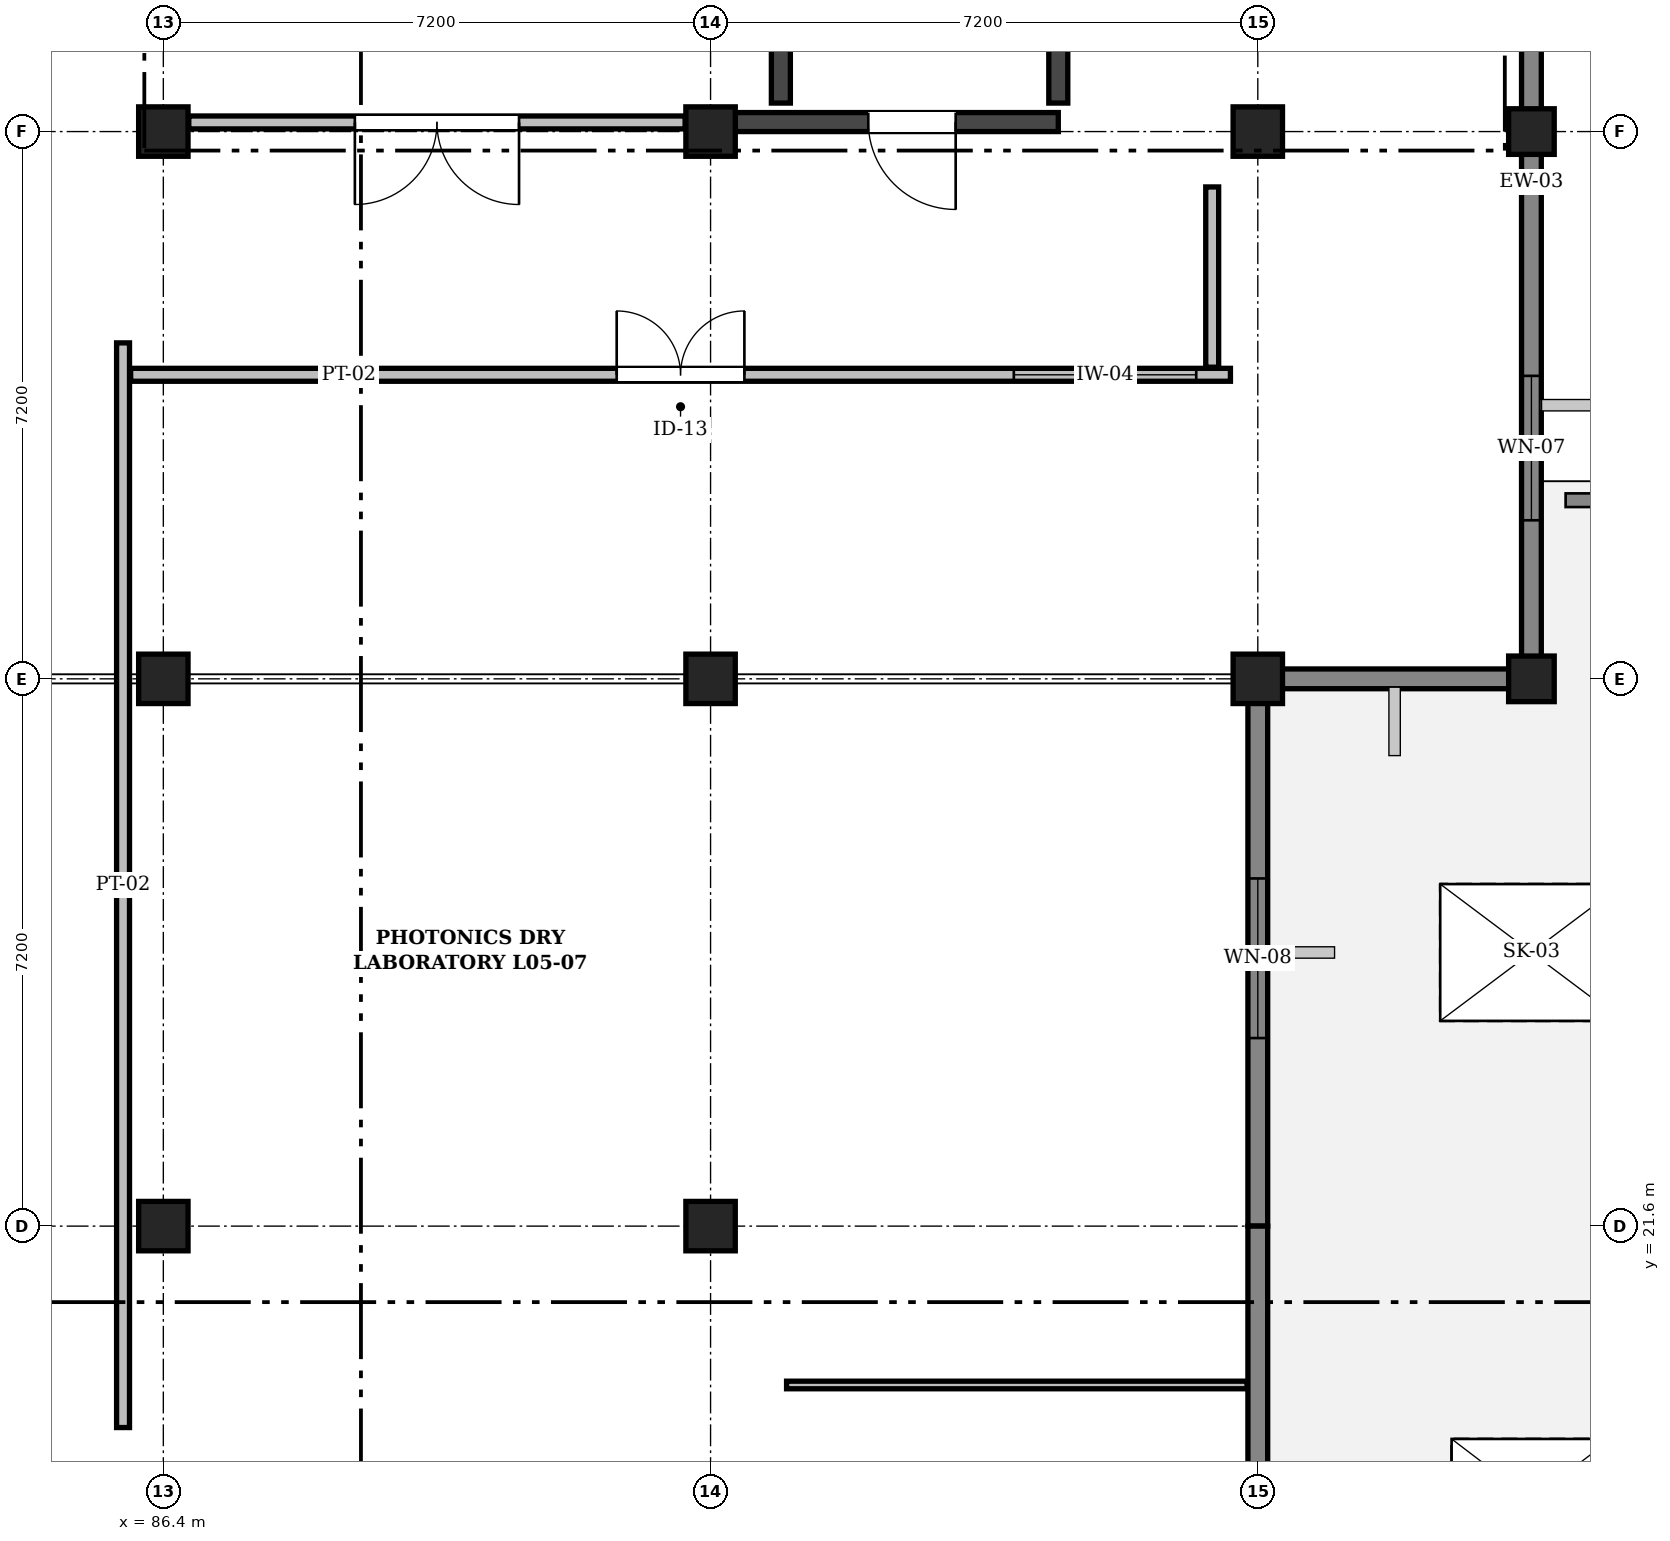
"""IFC4 building model, lengths in metres.
Left out: names, types, materials, properties, quantities, classifications, styles, units other than length and angle.
Written with IfcOpenShell. Run it as: python <this file> out.ifc"""

import sys

from ifc_helpers import new_model, si_unit, direction, frame, frame_2d, origin, origin_2d, place, context, subcontext, project, spatial, rectangle, extrude, element, fill, save


model = new_model("IFC4")
c1 = context("Model", 3, precision=1e-05, world=origin(), true_north=direction((0.0, 1.0)))
c2 = subcontext(c1, "Body", "Model", "MODEL_VIEW")
j1 = project(units=[si_unit("LENGTHUNIT", "METRE"), si_unit("PLANEANGLEUNIT", "RADIAN")], contexts=[c1])
p1 = place(None, origin())
s1 = spatial("IfcSite", under=j1, at=p1, CompositionType="ELEMENT")
p2 = place(p1, origin())
s2 = spatial("IfcBuilding", under=s1, at=p2, CompositionType="ELEMENT")
p3 = place(p2, frame((0.0, 0.0, 23.4)))
s3 = spatial("IfcBuildingStorey", under=s2, at=p3, CompositionType="ELEMENT", Elevation=23.4)
for number, where, z_axis, x_axis in (
    (1, (86.4, 21.6, 0.0), (0.0, 0.0, 1.0), (1.0, 0.0, 0.0)),
    (2, (86.4, 28.8, 0.0), (0.0, 0.0, 1.0), (1.0, 0.0, 0.0)),
    (3, (86.4, 36.0, 0.0), (0.0, 0.0, 1.0), (1.0, 0.0, 0.0)),
    (4, (93.6, 21.6, 0.0), (0.0, 0.0, 1.0), (1.0, 0.0, 0.0)),
    (5, (93.6, 28.8, 0.0), (0.0, 0.0, 1.0), (1.0, 0.0, 0.0)),
    (6, (93.6, 36.0, 0.0), (0.0, 0.0, 1.0), (1.0, 0.0, 0.0)),
    (7, (100.8, 28.8, 0.0), (0.0, 0.0, 1.0), (1.0, 0.0, 0.0)),
    (8, (100.8, 36.0, 0.0), (0.0, 0.0, 1.0), (1.0, 0.0, 0.0)),
):
    element("IfcColumn", number, at=place(p3, frame(where, z_axis=z_axis, x_axis=x_axis)), inside=s3, PredefinedType="COLUMN", context=c2, shape_type="SweptSolid", body=[
        extrude(rectangle(XDim=0.65, YDim=0.65, at=origin_2d()), origin(), (0.0, 0.0, 1.0), 4.5),
    ])
for number, where, z_axis, x_axis in (
    (9, (104.4, 28.8, 0.0), (0.0, 0.0, 1.0), (1.0, 0.0, 0.0)),
    (10, (104.4, 36.0, 0.0), (0.0, 0.0, 1.0), (1.0, 0.0, 0.0)),
):
    element("IfcColumn", number, at=place(p3, frame(where, z_axis=z_axis, x_axis=x_axis)), inside=s3, PredefinedType="COLUMN", context=c2, shape_type="SweptSolid", body=[
        extrude(rectangle(XDim=0.6, YDim=0.6, at=origin_2d()), origin(), (0.0, 0.0, 1.0), 4.5),
    ])
p4 = place(p3, frame((104.4, 43.2, 0.0), z_axis=(0.0, 0.0, 1.0), x_axis=(0.0, -1.0, 0.0)))
e11 = element("IfcWall", 11, at=p4, inside=s3, PredefinedType="SOLIDWALL", context=c2, shape_type="SweptSolid", body=[
    extrude(rectangle(XDim=7.2, YDim=0.26, at=frame_2d((3.6, 0.0))), origin(), (0.0, 0.0, 1.0), 4.22),
])
p5 = place(p4, frame((2.725, 0.0, 0.95)))
e12 = element("IfcOpeningElement", 12, at=p5, cuts=e11, PredefinedType="OPENING", context=c2, shape_type="SweptSolid", body=[
    extrude(rectangle(XDim=1.75, YDim=1.3, at=frame_2d((0.875, 0.65))), frame((0.0, 0.142, 0.0), z_axis=(0.0, -1.0, 0.0), x_axis=(1.0, 0.0, 0.0)), (0.0, 0.0, 1.0), 0.284),
])
p6 = place(p3, frame((104.4, 36.0, 0.0), z_axis=(0.0, 0.0, 1.0), x_axis=(0.0, -1.0, 0.0)))
e13 = element("IfcWall", 13, at=p6, inside=s3, PredefinedType="SOLIDWALL", context=c2, shape_type="SweptSolid", body=[
    extrude(rectangle(XDim=7.048, YDim=0.26, at=frame_2d((3.524, 0.0))), origin(), (0.0, 0.0, 1.0), 4.22),
])
p7 = place(p6, frame((3.214, 0.0, 0.95)))
e14 = element("IfcOpeningElement", 14, at=p7, cuts=e13, PredefinedType="OPENING", context=c2, shape_type="SweptSolid", body=[
    extrude(rectangle(XDim=1.9, YDim=1.3, at=frame_2d((0.95, 0.65))), frame((0.0, 0.142, 0.0), z_axis=(0.0, -1.0, 0.0), x_axis=(1.0, 0.0, 0.0)), (0.0, 0.0, 1.0), 0.284),
])
p8 = place(p3, frame((104.55, 28.8, 0.0), z_axis=(0.0, 0.0, 1.0), x_axis=(-1.0, 0.0, 0.0)))
e15 = element("IfcWall", 15, at=p8, inside=s3, PredefinedType="SOLIDWALL", context=c2, shape_type="SweptSolid", body=[
    extrude(rectangle(XDim=3.9, YDim=0.26, at=frame_2d((1.95, 0.0))), origin(), (0.0, 0.0, 1.0), 4.22),
])
p9 = place(p3, frame((100.8, 28.648, 0.0), z_axis=(0.0, 0.0, 1.0), x_axis=(0.0, -1.0, 0.0)))
e16 = element("IfcWall", 16, at=p9, inside=s3, PredefinedType="SOLIDWALL", context=c2, shape_type="SweptSolid", body=[
    extrude(rectangle(XDim=7.048, YDim=0.26, at=frame_2d((3.524, 0.0))), origin(), (0.0, 0.0, 1.0), 4.22),
])
p10 = place(p9, frame((2.474, 0.0, 0.95)))
e17 = element("IfcOpeningElement", 17, at=p10, cuts=e16, PredefinedType="OPENING", context=c2, shape_type="SweptSolid", body=[
    extrude(rectangle(XDim=2.1, YDim=1.3, at=frame_2d((1.05, 0.65))), frame((0.0, 0.142, 0.0), z_axis=(0.0, -1.0, 0.0), x_axis=(1.0, 0.0, 0.0)), (0.0, 0.0, 1.0), 0.284),
])
p11 = place(p3, frame((100.8, 21.6, 0.0), z_axis=(0.0, 0.0, 1.0), x_axis=(0.0, -1.0, 0.0)))
e18 = element("IfcWall", 18, at=p11, inside=s3, PredefinedType="SOLIDWALL", context=c2, shape_type="SweptSolid", body=[
    extrude(rectangle(XDim=7.2, YDim=0.26, at=frame_2d((3.6, 0.0))), origin(), (0.0, 0.0, 1.0), 4.22),
])
p12 = place(p11, frame((3.485, 0.0, 0.95)))
e19 = element("IfcOpeningElement", 19, at=p12, cuts=e18, PredefinedType="OPENING", context=c2, shape_type="SweptSolid", body=[
    extrude(rectangle(XDim=2.3, YDim=1.3, at=frame_2d((1.15, 0.65))), frame((0.0, 0.142, 0.0), z_axis=(0.0, -1.0, 0.0), x_axis=(1.0, 0.0, 0.0)), (0.0, 0.0, 1.0), 0.284),
])
p13 = place(p3, frame((104.85, 31.15, 0.0), z_axis=(0.0, 0.0, 1.0), x_axis=(1.0, 0.0, 0.0)))
e20 = element("IfcWall", 20, at=p13, inside=s3, PredefinedType="PARAPET", context=c2, shape_type="SweptSolid", body=[
    extrude(rectangle(XDim=7.224, YDim=0.18, at=frame_2d((3.612, 0.0))), origin(), (0.0, 0.0, 1.0), 0.95),
])
p14 = place(p3, frame((93.925, 36.125, 0.0), z_axis=(0.0, 0.0, 1.0), x_axis=(1.0, 0.0, 0.0)))
e21 = element("IfcWall", 21, at=p14, inside=s3, PredefinedType="SHEAR", context=c2, shape_type="SweptSolid", body=[
    extrude(rectangle(XDim=4.25, YDim=0.25, at=frame_2d((2.125, 0.0))), origin(), (0.0, 0.0, 1.0), 4.25),
])
p15 = place(p14, frame((1.75, 0.0, 0.0)))
e22 = element("IfcOpeningElement", 22, at=p15, cuts=e21, PredefinedType="OPENING", context=c2, shape_type="SweptSolid", body=[
    extrude(rectangle(XDim=1.15, YDim=2.15, at=frame_2d((0.575, 1.075))), frame((0.0, 0.137, 0.0), z_axis=(0.0, -1.0, 0.0), x_axis=(1.0, 0.0, 0.0)), (0.0, 0.0, 1.0), 0.274),
])
p16 = place(p3, frame((94.525, 36.375, 0.0), z_axis=(0.0, 0.0, 1.0), x_axis=(0.0, 1.0, 0.0)))
e23 = element("IfcWall", 23, at=p16, inside=s3, PredefinedType="SHEAR", context=c2, shape_type="SweptSolid", body=[
    extrude(rectangle(XDim=2.77, YDim=0.25, at=frame_2d((1.385, 0.0))), origin(), (0.0, 0.0, 1.0), 4.25),
])
p17 = place(p3, frame((98.175, 36.375, 0.0), z_axis=(0.0, 0.0, 1.0), x_axis=(0.0, 1.0, 0.0)))
e24 = element("IfcWall", 24, at=p17, inside=s3, PredefinedType="SHEAR", context=c2, shape_type="SweptSolid", body=[
    extrude(rectangle(XDim=3.225, YDim=0.25, at=frame_2d((1.613, 0.0))), origin(), (0.0, 0.0, 1.0), 4.25),
])
p18 = place(p3, frame((85.87, 18.95, 0.0), z_axis=(0.0, 0.0, 1.0), x_axis=(0.0, 1.0, 0.0)))
e25 = element("IfcWall", 25, at=p18, inside=s3, PredefinedType="PARTITIONING", context=c2, shape_type="SweptSolid", body=[
    extrude(rectangle(XDim=14.27, YDim=0.17, at=frame_2d((7.135, 0.0))), origin(), (0.0, 0.0, 1.0), 4.16),
])
p19 = place(p3, frame((85.97, 32.8, 0.0), z_axis=(0.0, 0.0, 1.0), x_axis=(1.0, 0.0, 0.0)))
e26 = element("IfcWall", 26, at=p19, inside=s3, PredefinedType="PARTITIONING", context=c2, shape_type="SweptSolid", body=[
    extrude(rectangle(XDim=14.47, YDim=0.17, at=frame_2d((7.235, 0.0))), origin(), (0.0, 0.0, 1.0), 4.16),
])
p20 = place(p19, frame((6.395, 0.0, 0.0)))
e27 = element("IfcOpeningElement", 27, at=p20, cuts=e26, PredefinedType="OPENING", context=c2, shape_type="SweptSolid", body=[
    extrude(rectangle(XDim=1.68, YDim=2.28, at=frame_2d((0.84, 1.14))), frame((0.0, 0.097, 0.0), z_axis=(0.0, -1.0, 0.0), x_axis=(1.0, 0.0, 0.0)), (0.0, 0.0, 1.0), 0.194),
])
p21 = place(p19, frame((11.62, 0.0, 1.05)))
e28 = element("IfcOpeningElement", 28, at=p21, cuts=e26, PredefinedType="OPENING", context=c2, shape_type="SweptSolid", body=[
    extrude(rectangle(XDim=2.4, YDim=1.15, at=frame_2d((1.2, 0.575))), frame((0.0, 0.097, 0.0), z_axis=(0.0, -1.0, 0.0), x_axis=(1.0, 0.0, 0.0)), (0.0, 0.0, 1.0), 0.194),
])
p22 = place(p3, frame((100.2, 32.9, 0.0), z_axis=(0.0, 0.0, 1.0), x_axis=(0.0, 1.0, 0.0)))
e29 = element("IfcWall", 29, at=p22, inside=s3, PredefinedType="PARTITIONING", context=c2, shape_type="SweptSolid", body=[
    extrude(rectangle(XDim=2.372, YDim=0.17, at=frame_2d((1.186, 0.0))), origin(), (0.0, 0.0, 1.0), 4.16),
])
p23 = place(p3, frame((86.735, 36.12, 0.0), z_axis=(0.0, 0.0, 1.0), x_axis=(1.0, 0.0, 0.0)))
e30 = element("IfcWall", 30, at=p23, inside=s3, PredefinedType="PARTITIONING", context=c2, shape_type="SweptSolid", body=[
    extrude(rectangle(XDim=6.53, YDim=0.17, at=frame_2d((3.265, 0.0))), origin(), (0.0, 0.0, 1.0), 3.73),
])
p24 = place(p23, frame((2.185, 0.0, 0.0)))
e31 = element("IfcOpeningElement", 31, at=p24, cuts=e30, PredefinedType="OPENING", context=c2, shape_type="SweptSolid", body=[
    extrude(rectangle(XDim=2.16, YDim=2.35, at=frame_2d((1.08, 1.175))), frame((0.0, 0.097, 0.0), z_axis=(0.0, -1.0, 0.0), x_axis=(1.0, 0.0, 0.0)), (0.0, 0.0, 1.0), 0.194),
])
p25 = place(p3, frame((94.6, 19.51, 0.0), z_axis=(0.0, 0.0, 1.0), x_axis=(1.0, 0.0, 0.0)))
e32 = element("IfcWall", 32, at=p25, inside=s3, PredefinedType="PARTITIONING", context=c2, shape_type="SweptSolid", body=[
    extrude(rectangle(XDim=6.058, YDim=0.1, at=frame_2d((3.029, 0.0))), origin(), (0.0, 0.0, 1.0), 4.16),
])
p26 = place(p7, origin())
e33 = element("IfcWindow", 33, at=p26, inside=s3, PartitioningType="SINGLE_PANEL", PredefinedType="WINDOW", context=c2, shape_type="SweptSolid", body=[
    extrude(rectangle(XDim=1.9, YDim=1.3, at=frame_2d((0.95, 0.65))), frame((0.0, 0.03, 0.0), z_axis=(0.0, -1.0, 0.0), x_axis=(1.0, 0.0, 0.0)), (0.0, 0.0, 1.0), 0.06),
])
fill(e14, e33)
p27 = place(p10, origin())
e34 = element("IfcWindow", 34, at=p27, inside=s3, PartitioningType="SINGLE_PANEL", PredefinedType="WINDOW", context=c2, shape_type="SweptSolid", body=[
    extrude(rectangle(XDim=2.1, YDim=1.3, at=frame_2d((1.05, 0.65))), frame((0.0, 0.03, 0.0), z_axis=(0.0, -1.0, 0.0), x_axis=(1.0, 0.0, 0.0)), (0.0, 0.0, 1.0), 0.06),
])
fill(e17, e34)
p28 = place(p3, frame((0.0, 0.0, -0.25)))
p29 = place(p28, frame((104.4, 18.0, 0.2)))
e35 = element("IfcWindow", 35, at=p29, inside=s3, PartitioningType="SINGLE_PANEL", PredefinedType="SKYLIGHT", context=c2, shape_type="SweptSolid", body=[
    extrude(rectangle(XDim=2.1, YDim=1.6, at=origin_2d()), origin(), (0.0, 0.0, 1.0), 0.05),
])
p30 = place(p28, frame((104.4, 25.2, 0.2)))
e36 = element("IfcWindow", 36, at=p30, inside=s3, PartitioningType="SINGLE_PANEL", PredefinedType="SKYLIGHT", context=c2, shape_type="SweptSolid", body=[
    extrude(rectangle(XDim=2.4, YDim=1.8, at=origin_2d()), origin(), (0.0, 0.0, 1.0), 0.05),
])
p31 = place(p15, frame((1.15, 0.0, 0.0), z_axis=(0.0, 0.0, 1.0), x_axis=(-1.0, 0.0, 0.0)))
e37 = element("IfcDoor", 37, at=p31, inside=s3, OperationType="SINGLE_SWING_LEFT", PredefinedType="DOOR", context=c2, shape_type="SweptSolid", body=[
    extrude(rectangle(XDim=1.15, YDim=2.15, at=frame_2d((0.575, 1.075))), frame((0.0, 0.025, 0.0), z_axis=(0.0, -1.0, 0.0), x_axis=(1.0, 0.0, 0.0)), (0.0, 0.0, 1.0), 0.05),
])
fill(e22, e37)
p32 = place(p20, origin())
e38 = element("IfcDoor", 38, at=p32, inside=s3, OperationType="DOUBLE_DOOR_SINGLE_SWING", PredefinedType="DOOR", context=c2, shape_type="SweptSolid", body=[
    extrude(rectangle(XDim=1.68, YDim=2.28, at=frame_2d((0.84, 1.14))), frame((0.0, 0.025, 0.0), z_axis=(0.0, -1.0, 0.0), x_axis=(1.0, 0.0, 0.0)), (0.0, 0.0, 1.0), 0.05),
])
fill(e27, e38)
p33 = place(p21, origin())
e39 = element("IfcWindow", 39, at=p33, inside=s3, PartitioningType="SINGLE_PANEL", PredefinedType="WINDOW", context=c2, shape_type="SweptSolid", body=[
    extrude(rectangle(XDim=2.4, YDim=1.15, at=frame_2d((1.2, 0.575))), frame((0.0, 0.03, 0.0), z_axis=(0.0, -1.0, 0.0), x_axis=(1.0, 0.0, 0.0)), (0.0, 0.0, 1.0), 0.06),
])
fill(e28, e39)
p34 = place(p24, frame((2.16, 0.0, 0.0), z_axis=(0.0, 0.0, 1.0), x_axis=(-1.0, 0.0, 0.0)))
e40 = element("IfcDoor", 40, at=p34, inside=s3, OperationType="DOUBLE_DOOR_SINGLE_SWING", PredefinedType="DOOR", context=c2, shape_type="SweptSolid", body=[
    extrude(rectangle(XDim=2.16, YDim=2.35, at=frame_2d((1.08, 1.175))), frame((0.0, 0.025, 0.0), z_axis=(0.0, -1.0, 0.0), x_axis=(1.0, 0.0, 0.0)), (0.0, 0.0, 1.0), 0.05),
])
fill(e31, e40)
save(model, sys.argv[1])
